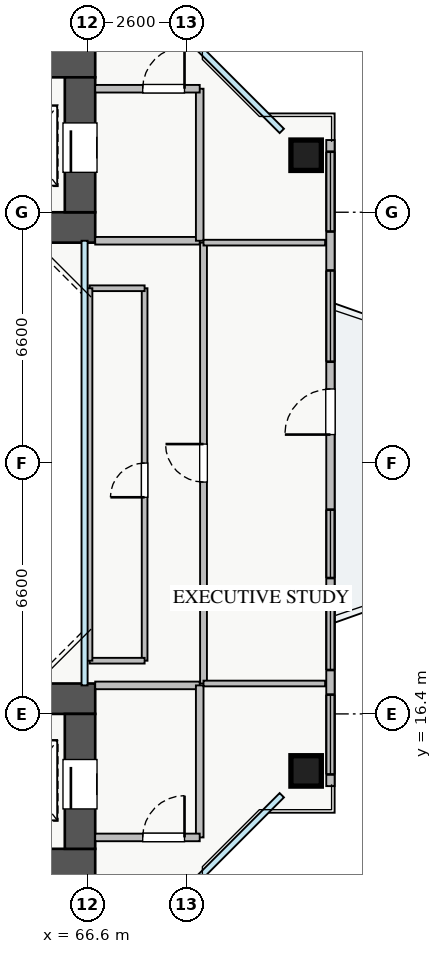
"""IFC4 building model, lengths in metres.
Left out: names, types, materials, properties, quantities, classifications, styles, units other than length and angle.
Written with IfcOpenShell. Run it as: python <this file> out.ifc"""

import sys

from ifc_helpers import new_model, si_unit, direction, frame, frame_2d, origin, origin_2d, place, context, subcontext, project, spatial, rectangle, extrude, source, transform, mapped, element, fill, save


model = new_model("IFC4")
c1 = context("Model", 3, precision=1e-05, world=origin(), true_north=direction((0.0, 1.0)))
c2 = subcontext(c1, "Body", "Model", "MODEL_VIEW")
j1 = project(units=[si_unit("LENGTHUNIT", "METRE"), si_unit("PLANEANGLEUNIT", "RADIAN")], contexts=[c1])
p1 = place(None, origin())
s1 = spatial("IfcSite", under=j1, at=p1, CompositionType="ELEMENT")
p2 = place(p1, origin())
s2 = spatial("IfcBuilding", under=s1, at=p2, CompositionType="ELEMENT")
p3 = place(p2, frame((0.0, 0.0, 110.0)))
s3 = spatial("IfcBuildingStorey", under=s2, at=p3, CompositionType="ELEMENT", Elevation=110.0)
p4 = place(p3, frame((54.2, 29.2, 0.0), z_axis=(0.0, 0.0, 1.0), x_axis=(1.0, 0.0, 0.0)))
e1 = element("IfcWall", 1, at=p4, inside=s3, PredefinedType="SHEAR", context=c2, shape_type="SweptSolid", body=[
    extrude(rectangle(XDim=12.6, YDim=0.8, at=frame_2d((6.3, 0.0))), origin(), (0.0, 0.0, 1.0), 3.25),
])
p5 = place(p3, frame((54.2, 33.55, 0.0), z_axis=(0.0, 0.0, 1.0), x_axis=(1.0, 0.0, 0.0)))
e2 = element("IfcWall", 2, at=p5, inside=s3, PredefinedType="SHEAR", context=c2, shape_type="SweptSolid", body=[
    extrude(rectangle(XDim=12.6, YDim=0.8, at=frame_2d((6.3, 0.0))), origin(), (0.0, 0.0, 1.0), 3.25),
])
p6 = place(p5, frame((8.2, 0.0, 0.0)))
e3 = element("IfcOpeningElement", 3, at=p6, cuts=e2, PredefinedType="OPENING", context=c2, shape_type="SweptSolid", body=[
    extrude(rectangle(XDim=1.1, YDim=2.05, at=frame_2d((0.55, 1.025))), frame((0.0, 0.41, 0.0), z_axis=(0.0, -1.0, 0.0), x_axis=(1.0, 0.0, 0.0)), (0.0, 0.0, 1.0), 0.82),
])
p7 = place(p3, frame((66.4, 29.6, 0.0), z_axis=(0.0, 0.0, 1.0), x_axis=(0.0, 1.0, 0.0)))
e4 = element("IfcWall", 4, at=p7, inside=s3, PredefinedType="SHEAR", context=c2, shape_type="SweptSolid", body=[
    extrude(rectangle(XDim=3.55, YDim=0.8, at=frame_2d((1.775, 0.0))), origin(), (0.0, 0.0, 1.0), 3.25),
])
p8 = place(p7, frame((1.05, 0.0, 0.0)))
e5 = element("IfcOpeningElement", 5, at=p8, cuts=e4, PredefinedType="OPENING", context=c2, shape_type="SweptSolid", body=[
    extrude(rectangle(XDim=1.3, YDim=2.05, at=frame_2d((0.65, 1.025))), frame((0.0, 0.41, 0.0), z_axis=(0.0, -1.0, 0.0), x_axis=(1.0, 0.0, 0.0)), (0.0, 0.0, 1.0), 0.82),
])
p9 = place(p3, frame((54.2, 12.45, 0.0), z_axis=(0.0, 0.0, 1.0), x_axis=(1.0, 0.0, 0.0)))
e6 = element("IfcWall", 6, at=p9, inside=s3, PredefinedType="SHEAR", context=c2, shape_type="SweptSolid", body=[
    extrude(rectangle(XDim=12.6, YDim=0.8, at=frame_2d((6.3, 0.0))), origin(), (0.0, 0.0, 1.0), 3.25),
])
p10 = place(p9, frame((8.2, 0.0, 0.0)))
e7 = element("IfcOpeningElement", 7, at=p10, cuts=e6, PredefinedType="OPENING", context=c2, shape_type="SweptSolid", body=[
    extrude(rectangle(XDim=1.1, YDim=2.05, at=frame_2d((0.55, 1.025))), frame((0.0, 0.41, 0.0), z_axis=(0.0, -1.0, 0.0), x_axis=(1.0, 0.0, 0.0)), (0.0, 0.0, 1.0), 0.82),
])
p11 = place(p3, frame((54.2, 16.8, 0.0), z_axis=(0.0, 0.0, 1.0), x_axis=(1.0, 0.0, 0.0)))
e8 = element("IfcWall", 8, at=p11, inside=s3, PredefinedType="SHEAR", context=c2, shape_type="SweptSolid", body=[
    extrude(rectangle(XDim=12.6, YDim=0.8, at=frame_2d((6.3, 0.0))), origin(), (0.0, 0.0, 1.0), 3.25),
])
p12 = place(p3, frame((66.4, 12.85, 0.0), z_axis=(0.0, 0.0, 1.0), x_axis=(0.0, 1.0, 0.0)))
e9 = element("IfcWall", 9, at=p12, inside=s3, PredefinedType="SHEAR", context=c2, shape_type="SweptSolid", body=[
    extrude(rectangle(XDim=3.55, YDim=0.8, at=frame_2d((1.775, 0.0))), origin(), (0.0, 0.0, 1.0), 3.25),
])
p13 = place(p12, frame((1.05, 0.0, 0.0)))
e10 = element("IfcOpeningElement", 10, at=p13, cuts=e9, PredefinedType="OPENING", context=c2, shape_type="SweptSolid", body=[
    extrude(rectangle(XDim=1.3, YDim=2.05, at=frame_2d((0.65, 1.025))), frame((0.0, 0.41, 0.0), z_axis=(0.0, -1.0, 0.0), x_axis=(1.0, 0.0, 0.0)), (0.0, 0.0, 1.0), 0.82),
])
m1 = source(origin(), c2, "Body", "SweptSolid", [
    extrude(rectangle(XDim=0.8, YDim=0.8, at=origin_2d()), origin(), (0.0, 0.0, 1.0), 3.25),
])
for number, where, z_axis, x_axis in (
    (11, (72.35, 14.9, 0.0), (0.0, 0.0, 1.0), (1.0, 0.0, 0.0)),
    (12, (72.35, 31.1, 0.0), (0.0, 0.0, 1.0), (1.0, 0.0, 0.0)),
):
    element("IfcColumn", number, at=place(p3, frame(where, z_axis=z_axis, x_axis=x_axis)), inside=s3, PredefinedType="COLUMN", context=c2, shape_type="MappedRepresentation", body=[
        mapped(m1, transform((0.0, 0.0, 0.0), x_axis=(1.0, 0.0, 0.0), y_axis=(0.0, 1.0, 0.0), z_axis=(0.0, 0.0, 1.0), scale=1.0)),
    ])
p14 = place(p3, frame((72.99, 14.5, 0.0), z_axis=(0.0, 0.0, 1.0), x_axis=(0.0, 1.0, 0.0)))
e13 = element("IfcWall", 13, at=p14, inside=s3, PredefinedType="STANDARD", context=c2, shape_type="SweptSolid", body=[
    extrude(rectangle(XDim=17.0, YDim=0.22, at=frame_2d((8.5, 0.0))), origin(), (0.0, 0.0, 1.0), 2.61),
])
p15 = place(p14, frame((9.25, 0.0, 0.0)))
e14 = element("IfcOpeningElement", 14, at=p15, cuts=e13, PredefinedType="OPENING", context=c2, shape_type="SweptSolid", body=[
    extrude(rectangle(XDim=1.2, YDim=2.1, at=frame_2d((0.6, 1.05))), frame((0.0, 0.12, 0.0), z_axis=(0.0, -1.0, 0.0), x_axis=(1.0, 0.0, 0.0)), (0.0, 0.0, 1.0), 0.24),
])
p16 = place(p14, frame((0.308, 0.0, 0.9)))
e15 = element("IfcOpeningElement", 15, at=p16, cuts=e13, PredefinedType="OPENING", context=c2, shape_type="SweptSolid", body=[
    extrude(rectangle(XDim=2.1, YDim=1.5, at=frame_2d((1.05, 0.75))), frame((0.0, 0.12, 0.0), z_axis=(0.0, -1.0, 0.0), x_axis=(1.0, 0.0, 0.0)), (0.0, 0.0, 1.0), 0.24),
])
p17 = place(p14, frame((5.475, 0.0, 0.9)))
e16 = element("IfcOpeningElement", 16, at=p17, cuts=e13, PredefinedType="OPENING", context=c2, shape_type="SweptSolid", body=[
    extrude(rectangle(XDim=1.8, YDim=1.45, at=frame_2d((0.9, 0.725))), frame((0.0, 0.12, 0.0), z_axis=(0.0, -1.0, 0.0), x_axis=(1.0, 0.0, 0.0)), (0.0, 0.0, 1.0), 0.24),
])
p18 = place(p14, frame((14.593, 0.0, 0.9)))
e17 = element("IfcOpeningElement", 17, at=p18, cuts=e13, PredefinedType="OPENING", context=c2, shape_type="SweptSolid", body=[
    extrude(rectangle(XDim=2.1, YDim=1.5, at=frame_2d((1.05, 0.75))), frame((0.0, 0.12, 0.0), z_axis=(0.0, -1.0, 0.0), x_axis=(1.0, 0.0, 0.0)), (0.0, 0.0, 1.0), 0.24),
])
p19 = place(p14, frame((3.055, 0.0, 0.9)))
e18 = element("IfcOpeningElement", 18, at=p19, cuts=e13, PredefinedType="OPENING", context=c2, shape_type="SweptSolid", body=[
    extrude(rectangle(XDim=2.1, YDim=1.5, at=frame_2d((1.05, 0.75))), frame((0.0, 0.12, 0.0), z_axis=(0.0, -1.0, 0.0), x_axis=(1.0, 0.0, 0.0)), (0.0, 0.0, 1.0), 0.24),
])
p20 = place(p14, frame((11.167, 0.0, 0.9)))
e19 = element("IfcOpeningElement", 19, at=p20, cuts=e13, PredefinedType="OPENING", context=c2, shape_type="SweptSolid", body=[
    extrude(rectangle(XDim=2.4, YDim=1.5, at=frame_2d((1.2, 0.75))), frame((0.0, 0.12, 0.0), z_axis=(0.0, -1.0, 0.0), x_axis=(1.0, 0.0, 0.0)), (0.0, 0.0, 1.0), 0.24),
])
p21 = place(p3, frame((66.8, 28.85, 0.0), z_axis=(0.0, 0.0, 1.0), x_axis=(1.0, 0.0, 0.0)))
e20 = element("IfcWall", 20, at=p21, inside=s3, PredefinedType="PARTITIONING", context=c2, shape_type="SweptSolid", body=[
    extrude(rectangle(XDim=2.75, YDim=0.2, at=frame_2d((1.375, 0.0))), origin(), (0.0, 0.0, 1.0), 3.07),
])
p22 = place(p3, frame((69.55, 28.85, 0.0), z_axis=(0.0, 0.0, 1.0), x_axis=(0.0, 1.0, 0.0)))
e21 = element("IfcWall", 21, at=p22, inside=s3, PredefinedType="PARTITIONING", context=c2, shape_type="SweptSolid", body=[
    extrude(rectangle(XDim=4.0, YDim=0.2, at=frame_2d((2.0, 0.0))), origin(), (0.0, 0.0, 1.0), 3.07),
])
p23 = place(p3, frame((66.8, 32.85, 0.0), z_axis=(0.0, 0.0, 1.0), x_axis=(1.0, 0.0, 0.0)))
e22 = element("IfcWall", 22, at=p23, inside=s3, PredefinedType="PARTITIONING", context=c2, shape_type="SweptSolid", body=[
    extrude(rectangle(XDim=2.75, YDim=0.2, at=frame_2d((1.375, 0.0))), origin(), (0.0, 0.0, 1.0), 3.07),
])
p24 = place(p23, frame((1.25, 0.0, 0.0)))
e23 = element("IfcOpeningElement", 23, at=p24, cuts=e22, PredefinedType="OPENING", context=c2, shape_type="SweptSolid", body=[
    extrude(rectangle(XDim=1.1, YDim=2.05, at=frame_2d((0.55, 1.025))), frame((0.0, 0.11, 0.0), z_axis=(0.0, -1.0, 0.0), x_axis=(1.0, 0.0, 0.0)), (0.0, 0.0, 1.0), 0.22),
])
p25 = place(p3, frame((66.8, 17.15, 0.0), z_axis=(0.0, 0.0, 1.0), x_axis=(1.0, 0.0, 0.0)))
e24 = element("IfcWall", 24, at=p25, inside=s3, PredefinedType="PARTITIONING", context=c2, shape_type="SweptSolid", body=[
    extrude(rectangle(XDim=2.75, YDim=0.2, at=frame_2d((1.375, 0.0))), origin(), (0.0, 0.0, 1.0), 3.07),
])
p26 = place(p3, frame((69.55, 13.15, 0.0), z_axis=(0.0, 0.0, 1.0), x_axis=(0.0, 1.0, 0.0)))
e25 = element("IfcWall", 25, at=p26, inside=s3, PredefinedType="PARTITIONING", context=c2, shape_type="SweptSolid", body=[
    extrude(rectangle(XDim=4.0, YDim=0.2, at=frame_2d((2.0, 0.0))), origin(), (0.0, 0.0, 1.0), 3.07),
])
p27 = place(p3, frame((66.8, 13.15, 0.0), z_axis=(0.0, 0.0, 1.0), x_axis=(1.0, 0.0, 0.0)))
e26 = element("IfcWall", 26, at=p27, inside=s3, PredefinedType="PARTITIONING", context=c2, shape_type="SweptSolid", body=[
    extrude(rectangle(XDim=2.75, YDim=0.2, at=frame_2d((1.375, 0.0))), origin(), (0.0, 0.0, 1.0), 3.07),
])
p28 = place(p27, frame((1.25, 0.0, 0.0)))
e27 = element("IfcOpeningElement", 27, at=p28, cuts=e26, PredefinedType="OPENING", context=c2, shape_type="SweptSolid", body=[
    extrude(rectangle(XDim=1.1, YDim=2.05, at=frame_2d((0.55, 1.025))), frame((0.0, 0.11, 0.0), z_axis=(0.0, -1.0, 0.0), x_axis=(1.0, 0.0, 0.0)), (0.0, 0.0, 1.0), 0.22),
])
p29 = place(p3, frame((69.65, 17.2, 0.0), z_axis=(0.0, 0.0, 1.0), x_axis=(0.0, 1.0, 0.0)))
e28 = element("IfcWall", 28, at=p29, inside=s3, PredefinedType="PARTITIONING", context=c2, shape_type="SweptSolid", body=[
    extrude(rectangle(XDim=11.6, YDim=0.18, at=frame_2d((5.8, 0.0))), origin(), (0.0, 0.0, 1.0), 3.07),
])
p30 = place(p29, frame((5.3, 0.0, 0.0)))
e29 = element("IfcOpeningElement", 29, at=p30, cuts=e28, PredefinedType="OPENING", context=c2, shape_type="SweptSolid", body=[
    extrude(rectangle(XDim=1.0, YDim=2.05, at=frame_2d((0.5, 1.025))), frame((0.0, 0.1, 0.0), z_axis=(0.0, -1.0, 0.0), x_axis=(1.0, 0.0, 0.0)), (0.0, 0.0, 1.0), 0.2),
])
for number, where, z_axis, x_axis in (
    (30, (69.65, 17.2, 0.0), (0.0, 0.0, 1.0), (1.0, 0.0, 0.0)),
    (31, (69.65, 28.8, 0.0), (0.0, 0.0, 1.0), (1.0, 0.0, 0.0)),
):
    element("IfcWall", number, at=place(p3, frame(where, z_axis=z_axis, x_axis=x_axis)), inside=s3, PredefinedType="PARTITIONING", context=c2, shape_type="SweptSolid", body=[
        extrude(rectangle(XDim=3.2, YDim=0.15, at=frame_2d((1.6, 0.0))), origin(), (0.0, 0.0, 1.0), 3.07),
    ])
p31 = place(p3, frame((68.1, 17.8, 0.0), z_axis=(0.0, 0.0, 1.0), x_axis=(0.0, 1.0, 0.0)))
e32 = element("IfcWall", 32, at=p31, inside=s3, PredefinedType="PARTITIONING", context=c2, shape_type="SweptSolid", body=[
    extrude(rectangle(XDim=9.8, YDim=0.15, at=frame_2d((4.9, 0.0))), origin(), (0.0, 0.0, 1.0), 3.07),
])
p32 = place(p31, frame((4.3, 0.0, 0.0)))
e33 = element("IfcOpeningElement", 33, at=p32, cuts=e32, PredefinedType="OPENING", context=c2, shape_type="SweptSolid", body=[
    extrude(rectangle(XDim=0.9, YDim=2.05, at=frame_2d((0.45, 1.025))), frame((0.0, 0.085, 0.0), z_axis=(0.0, -1.0, 0.0), x_axis=(1.0, 0.0, 0.0)), (0.0, 0.0, 1.0), 0.17),
])
p33 = place(p3, frame((66.65, 27.6, 0.0), z_axis=(0.0, 0.0, 1.0), x_axis=(1.0, 0.0, 0.0)))
e34 = element("IfcWall", 34, at=p33, inside=s3, PredefinedType="PARTITIONING", context=c2, shape_type="SweptSolid", body=[
    extrude(rectangle(XDim=1.45, YDim=0.15, at=frame_2d((0.725, 0.0))), origin(), (0.0, 0.0, 1.0), 2.821),
])
p34 = place(p3, frame((66.65, 17.8, 0.0), z_axis=(0.0, 0.0, 1.0), x_axis=(1.0, 0.0, 0.0)))
e35 = element("IfcWall", 35, at=p34, inside=s3, PredefinedType="PARTITIONING", context=c2, shape_type="SweptSolid", body=[
    extrude(rectangle(XDim=1.45, YDim=0.15, at=frame_2d((0.725, 0.0))), origin(), (0.0, 0.0, 1.0), 3.07),
])
p35 = place(p3, frame((66.65, 17.8, 0.0), z_axis=(0.0, 0.0, 1.0), x_axis=(0.0, 1.0, 0.0)))
e36 = element("IfcWall", 36, at=p35, inside=s3, PredefinedType="PARTITIONING", context=c2, shape_type="SweptSolid", body=[
    extrude(rectangle(XDim=9.8, YDim=0.15, at=frame_2d((4.9, 0.0))), origin(), (0.0, 0.0, 1.0), 2.665),
])
m2 = source(origin(), c2, "Body", "SweptSolid", [
    extrude(rectangle(XDim=1.2, YDim=2.1, at=frame_2d((0.6, 1.05))), frame((0.0, 0.025, 0.0), z_axis=(0.0, -1.0, 0.0), x_axis=(1.0, 0.0, 0.0)), (0.0, 0.0, 1.0), 0.05),
])
p36 = place(p15, origin())
e37 = element("IfcDoor", 37, at=p36, inside=s3, OperationType="SINGLE_SWING_LEFT", PredefinedType="DOOR", context=c2, shape_type="MappedRepresentation", body=[
    mapped(m2, transform((0.0, 0.0, 0.0), x_axis=(1.0, 0.0, 0.0), y_axis=(0.0, 1.0, 0.0), z_axis=(0.0, 0.0, 1.0), scale=1.0)),
])
fill(e14, e37)
m3 = source(origin(), c2, "Body", "SweptSolid", [
    extrude(rectangle(XDim=2.1, YDim=1.5, at=frame_2d((1.05, 0.75))), frame((0.0, 0.03, 0.0), z_axis=(0.0, -1.0, 0.0), x_axis=(1.0, 0.0, 0.0)), (0.0, 0.0, 1.0), 0.06),
])
p37 = place(p16, origin())
e38 = element("IfcWindow", 38, at=p37, inside=s3, PartitioningType="TRIPLE_PANEL_VERTICAL", PredefinedType="WINDOW", context=c2, shape_type="MappedRepresentation", body=[
    mapped(m3, transform((0.0, 0.0, 0.0), x_axis=(1.0, 0.0, 0.0), y_axis=(0.0, 1.0, 0.0), z_axis=(0.0, 0.0, 1.0), scale=1.0)),
])
fill(e15, e38)
m4 = source(origin(), c2, "Body", "SweptSolid", [
    extrude(rectangle(XDim=1.8, YDim=1.45, at=frame_2d((0.9, 0.725))), frame((0.0, 0.03, 0.0), z_axis=(0.0, -1.0, 0.0), x_axis=(1.0, 0.0, 0.0)), (0.0, 0.0, 1.0), 0.06),
])
p38 = place(p17, origin())
e39 = element("IfcWindow", 39, at=p38, inside=s3, PartitioningType="DOUBLE_PANEL_VERTICAL", PredefinedType="WINDOW", context=c2, shape_type="MappedRepresentation", body=[
    mapped(m4, transform((0.0, 0.0, 0.0), x_axis=(1.0, 0.0, 0.0), y_axis=(0.0, 1.0, 0.0), z_axis=(0.0, 0.0, 1.0), scale=1.0)),
])
fill(e16, e39)
p39 = place(p18, origin())
e40 = element("IfcWindow", 40, at=p39, inside=s3, PartitioningType="TRIPLE_PANEL_VERTICAL", PredefinedType="WINDOW", context=c2, shape_type="MappedRepresentation", body=[
    mapped(m3, transform((0.0, 0.0, 0.0), x_axis=(1.0, 0.0, 0.0), y_axis=(0.0, 1.0, 0.0), z_axis=(0.0, 0.0, 1.0), scale=1.0)),
])
fill(e17, e40)
m5 = source(origin(), c2, "Body", "SweptSolid", [
    extrude(rectangle(XDim=1.3, YDim=2.05, at=frame_2d((0.65, 1.025))), frame((0.0, 0.025, 0.0), z_axis=(0.0, -1.0, 0.0), x_axis=(1.0, 0.0, 0.0)), (0.0, 0.0, 1.0), 0.05),
])
p40 = place(p8, origin())
e41 = element("IfcDoor", 41, at=p40, inside=s3, OperationType="SLIDING_TO_LEFT", PredefinedType="DOOR", context=c2, shape_type="MappedRepresentation", body=[
    mapped(m5, transform((0.0, 0.0, 0.0), x_axis=(1.0, 0.0, 0.0), y_axis=(0.0, 1.0, 0.0), z_axis=(0.0, 0.0, 1.0), scale=1.0)),
])
fill(e5, e41)
p41 = place(p13, origin())
e42 = element("IfcDoor", 42, at=p41, inside=s3, OperationType="SLIDING_TO_RIGHT", PredefinedType="DOOR", context=c2, shape_type="MappedRepresentation", body=[
    mapped(m5, transform((0.0, 0.0, 0.0), x_axis=(1.0, 0.0, 0.0), y_axis=(0.0, 1.0, 0.0), z_axis=(0.0, 0.0, 1.0), scale=1.0)),
])
fill(e10, e42)
m6 = source(origin(), c2, "Body", "SweptSolid", [
    extrude(rectangle(XDim=1.1, YDim=2.05, at=frame_2d((0.55, 1.025))), frame((0.0, 0.025, 0.0), z_axis=(0.0, -1.0, 0.0), x_axis=(1.0, 0.0, 0.0)), (0.0, 0.0, 1.0), 0.05),
])
p42 = place(p24, origin())
e43 = element("IfcDoor", 43, at=p42, inside=s3, OperationType="SINGLE_SWING_RIGHT", PredefinedType="DOOR", context=c2, shape_type="MappedRepresentation", body=[
    mapped(m6, transform((0.0, 0.0, 0.0), x_axis=(1.0, 0.0, 0.0), y_axis=(0.0, 1.0, 0.0), z_axis=(0.0, 0.0, 1.0), scale=1.0)),
])
fill(e23, e43)
p43 = place(p28, origin())
e44 = element("IfcDoor", 44, at=p43, inside=s3, OperationType="SINGLE_SWING_RIGHT", PredefinedType="DOOR", context=c2, shape_type="MappedRepresentation", body=[
    mapped(m6, transform((0.0, 0.0, 0.0), x_axis=(1.0, 0.0, 0.0), y_axis=(0.0, 1.0, 0.0), z_axis=(0.0, 0.0, 1.0), scale=1.0)),
])
fill(e27, e44)
m7 = source(origin(), c2, "Body", "SweptSolid", [
    extrude(rectangle(XDim=1.0, YDim=2.05, at=frame_2d((0.5, 1.025))), frame((0.0, 0.025, 0.0), z_axis=(0.0, -1.0, 0.0), x_axis=(1.0, 0.0, 0.0)), (0.0, 0.0, 1.0), 0.05),
])
p44 = place(p30, origin())
e45 = element("IfcDoor", 45, at=p44, inside=s3, OperationType="SINGLE_SWING_RIGHT", PredefinedType="DOOR", context=c2, shape_type="MappedRepresentation", body=[
    mapped(m7, transform((0.0, 0.0, 0.0), x_axis=(1.0, 0.0, 0.0), y_axis=(0.0, 1.0, 0.0), z_axis=(0.0, 0.0, 1.0), scale=1.0)),
])
fill(e29, e45)
m8 = source(origin(), c2, "Body", "SweptSolid", [
    extrude(rectangle(XDim=0.9, YDim=2.05, at=frame_2d((0.45, 1.025))), frame((0.0, 0.025, 0.0), z_axis=(0.0, -1.0, 0.0), x_axis=(1.0, 0.0, 0.0)), (0.0, 0.0, 1.0), 0.05),
])
p45 = place(p32, origin())
e46 = element("IfcDoor", 46, at=p45, inside=s3, OperationType="SINGLE_SWING_LEFT", PredefinedType="DOOR", context=c2, shape_type="MappedRepresentation", body=[
    mapped(m8, transform((0.0, 0.0, 0.0), x_axis=(1.0, 0.0, 0.0), y_axis=(0.0, 1.0, 0.0), z_axis=(0.0, 0.0, 1.0), scale=1.0)),
])
fill(e33, e46)
p46 = place(p19, origin())
e47 = element("IfcWindow", 47, at=p46, inside=s3, PartitioningType="TRIPLE_PANEL_VERTICAL", PredefinedType="WINDOW", context=c2, shape_type="MappedRepresentation", body=[
    mapped(m3, transform((0.0, 0.0, 0.0), x_axis=(1.0, 0.0, 0.0), y_axis=(0.0, 1.0, 0.0), z_axis=(0.0, 0.0, 1.0), scale=1.0)),
])
fill(e18, e47)
m9 = source(origin(), c2, "Body", "SweptSolid", [
    extrude(rectangle(XDim=2.4, YDim=1.5, at=frame_2d((1.2, 0.75))), frame((0.0, 0.03, 0.0), z_axis=(0.0, -1.0, 0.0), x_axis=(1.0, 0.0, 0.0)), (0.0, 0.0, 1.0), 0.06),
])
p47 = place(p20, origin())
e48 = element("IfcWindow", 48, at=p47, inside=s3, PartitioningType="TRIPLE_PANEL_VERTICAL", PredefinedType="WINDOW", context=c2, shape_type="MappedRepresentation", body=[
    mapped(m9, transform((0.0, 0.0, 0.0), x_axis=(1.0, 0.0, 0.0), y_axis=(0.0, 1.0, 0.0), z_axis=(0.0, 0.0, 1.0), scale=1.0)),
])
fill(e19, e48)
save(model, sys.argv[1])
